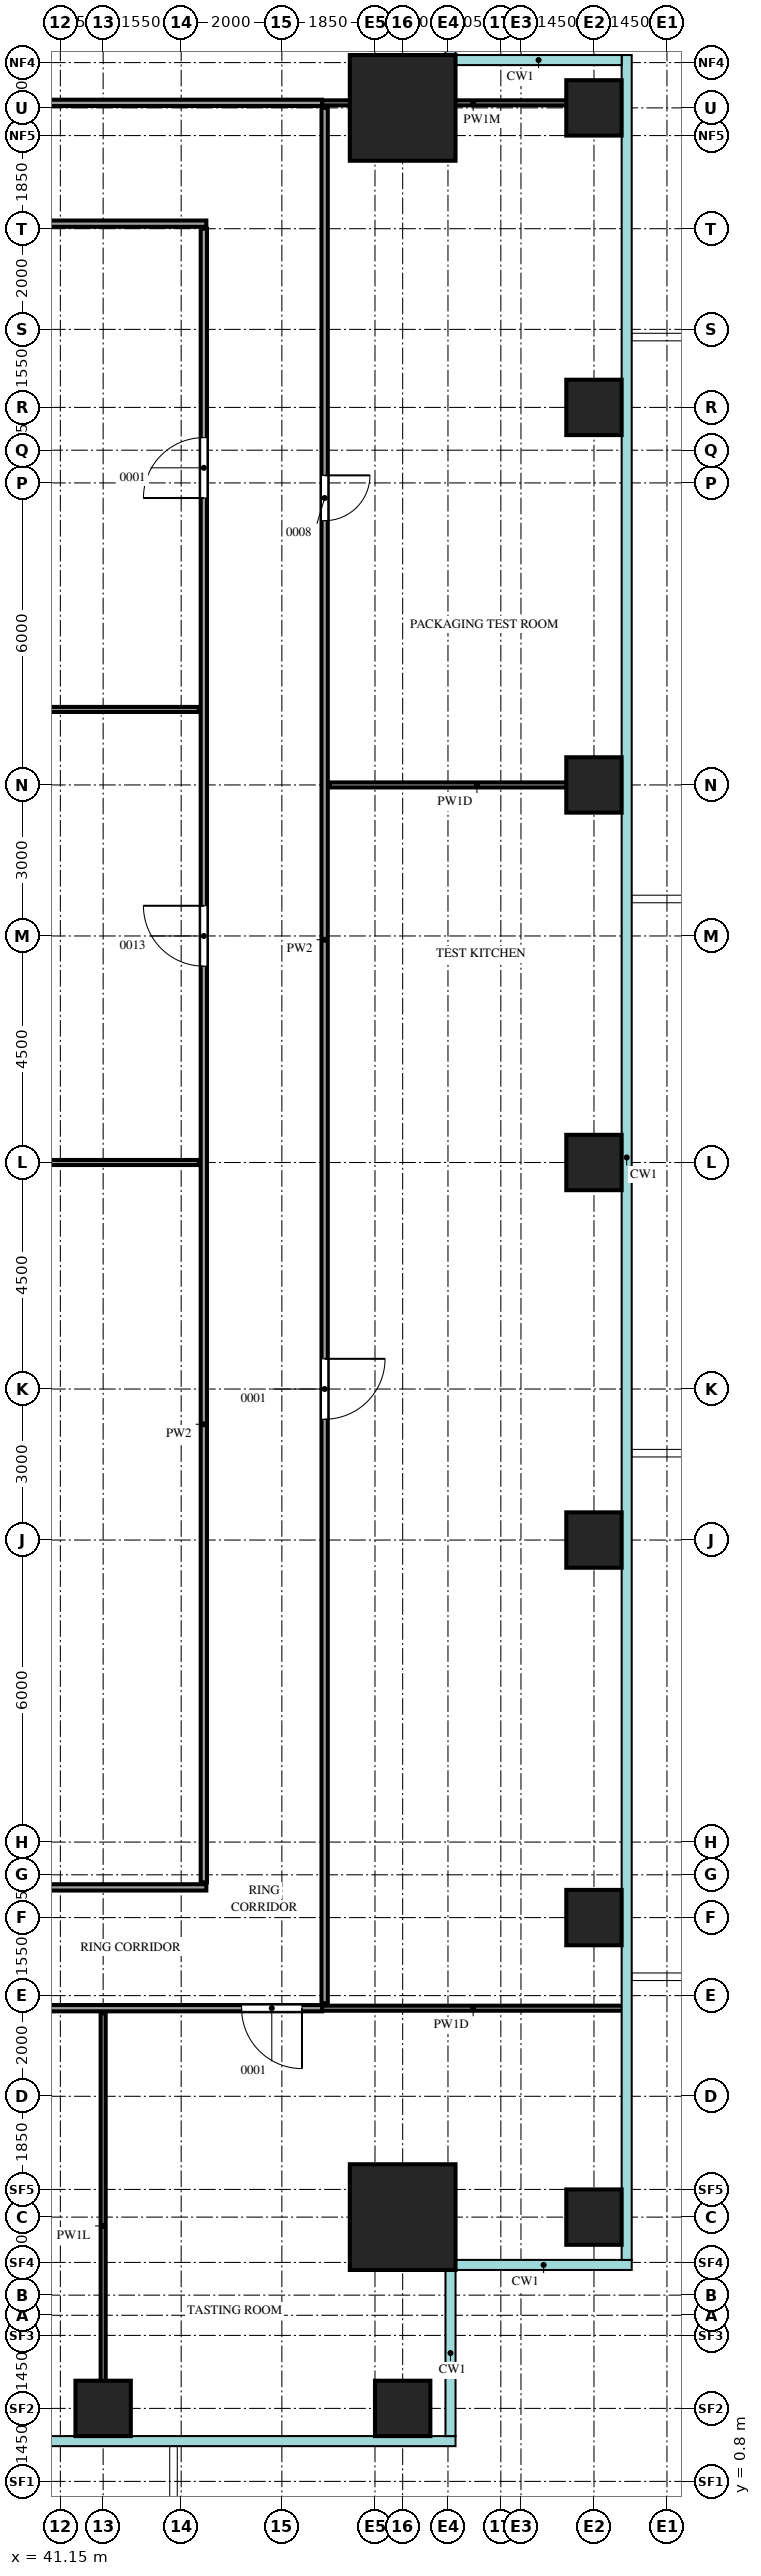
"""IFC4 building model, lengths in metres.
Left out: names, types, materials, properties, quantities, classifications, styles, units other than length and angle.
Written with IfcOpenShell. Run it as: python <this file> out.ifc"""

import sys

from ifc_helpers import new_model, si_unit, direction, frame, frame_2d, origin, origin_2d, place, context, subcontext, project, spatial, rectangle, extrude, source, transform, mapped, element, fill, save


model = new_model("IFC4")
c1 = context("Model", 3, precision=1e-05, world=origin(), true_north=direction((0.0, 1.0)))
c2 = subcontext(c1, "Body", "Model", "MODEL_VIEW")
j1 = project(units=[si_unit("LENGTHUNIT", "METRE"), si_unit("PLANEANGLEUNIT", "RADIAN")], contexts=[c1])
p1 = place(None, origin())
s1 = spatial("IfcSite", under=j1, at=p1, CompositionType="ELEMENT")
p2 = place(p1, origin())
s2 = spatial("IfcBuilding", under=s1, at=p2, CompositionType="ELEMENT")
p3 = place(p2, frame((0.0, 0.0, 123.5)))
s3 = spatial("IfcBuildingStorey", under=s2, at=p3, CompositionType="ELEMENT", Elevation=123.5)
m1 = source(origin(), c2, "Body", "SweptSolid", [
    extrude(rectangle(XDim=2.1, YDim=2.1, at=origin_2d()), origin(), (0.0, 0.0, 1.0), 4.4),
])
for number, where, z_axis, x_axis in (
    (1, (47.95, 47.95, 0.0), (0.0, 0.0, 1.0), (1.0, 0.0, 0.0)),
    (2, (47.95, 6.05, 0.0), (0.0, 0.0, 1.0), (1.0, 0.0, 0.0)),
):
    element("IfcColumn", number, at=place(p3, frame(where, z_axis=z_axis, x_axis=x_axis)), inside=s3, PredefinedType="COLUMN", context=c2, shape_type="MappedRepresentation", body=[
        mapped(m1, transform((0.0, 0.0, 0.0))),
    ])
m2 = source(origin(), c2, "Body", "SweptSolid", [
    extrude(rectangle(XDim=1.1, YDim=1.1, at=origin_2d()), origin(), (0.0, 0.0, 1.0), 4.1),
])
for number, where, z_axis, x_axis in (
    (3, (42.0, 2.25, 0.0), (0.0, 0.0, 1.0), (1.0, 0.0, 0.0)),
    (4, (47.95, 2.25, 0.0), (0.0, 0.0, 1.0), (1.0, 0.0, 0.0)),
    (5, (51.75, 6.05, 0.0), (0.0, 0.0, 1.0), (1.0, 0.0, 0.0)),
    (6, (51.75, 12.0, 0.0), (0.0, 0.0, 1.0), (1.0, 0.0, 0.0)),
    (7, (51.75, 19.5, 0.0), (0.0, 0.0, 1.0), (1.0, 0.0, 0.0)),
    (8, (51.75, 27.0, 0.0), (0.0, 0.0, 1.0), (1.0, 0.0, 0.0)),
    (9, (51.75, 34.5, 0.0), (0.0, 0.0, 1.0), (1.0, 0.0, 0.0)),
    (10, (51.75, 42.0, 0.0), (0.0, 0.0, 1.0), (1.0, 0.0, 0.0)),
    (11, (51.75, 47.95, 0.0), (0.0, 0.0, 1.0), (1.0, 0.0, 0.0)),
):
    element("IfcColumn", number, at=place(p3, frame(where, z_axis=z_axis, x_axis=x_axis)), inside=s3, PredefinedType="COLUMN", context=c2, shape_type="MappedRepresentation", body=[
        mapped(m2, transform((0.0, 0.0, 0.0))),
    ])
m3 = source(origin(), c2, "Body", "SweptSolid", [
    extrude(rectangle(XDim=8.45, YDim=0.1, at=frame_2d((4.225, 0.0))), origin(), (0.0, 0.0, 1.0), 3.6),
])
p4 = place(p3, frame((42.0, 1.65, 0.0), z_axis=(0.0, 0.0, 1.0), x_axis=(0.0, 1.0, 0.0)))
e12 = element("IfcWall", 12, at=p4, inside=s3, PredefinedType="PARTITIONING", context=c2, shape_type="MappedRepresentation", body=[
    mapped(m3, transform((0.0, 0.0, 0.0))),
])
m4 = source(origin(), c2, "Body", "SweptSolid", [
    extrude(rectangle(XDim=20.0, YDim=0.125, at=frame_2d((10.0, 0.0))), origin(), (0.0, 0.0, 1.0), 4.2),
])
p5 = place(p3, frame((26.35, 10.2, 0.0), z_axis=(0.0, 0.0, 1.0), x_axis=(1.0, 0.0, 0.0)))
e13 = element("IfcWall", 13, at=p5, inside=s3, PredefinedType="PARTITIONING", context=c2, shape_type="MappedRepresentation", body=[
    mapped(m4, transform((0.0, 0.0, 0.0))),
])
m5 = source(origin(), c2, "Body", "SweptSolid", [
    extrude(rectangle(XDim=1.2, YDim=2.1, at=frame_2d((0.6, 1.05))), frame((0.0, 0.073, 0.0), z_axis=(0.0, -1.0, 0.0), x_axis=(1.0, 0.0, 0.0)), (0.0, 0.0, 1.0), 0.145),
])
p6 = place(p5, frame((7.25, 0.0, 0.0)))
e14 = element("IfcOpeningElement", 14, at=p6, cuts=e13, PredefinedType="OPENING", context=c2, shape_type="MappedRepresentation", body=[
    mapped(m5, transform((0.0, 0.0, 0.0))),
])
p7 = place(p5, frame((18.4, 0.0, 0.0)))
e15 = element("IfcOpeningElement", 15, at=p7, cuts=e13, PredefinedType="OPENING", context=c2, shape_type="MappedRepresentation", body=[
    mapped(m5, transform((0.0, 0.0, 0.0))),
])
m6 = source(origin(), c2, "Body", "SweptSolid", [
    extrude(rectangle(XDim=6.0, YDim=0.1, at=frame_2d((3.0, 0.0))), origin(), (0.0, 0.0, 1.0), 4.2),
])
p8 = place(p3, frame((46.35, 10.2, 0.0), z_axis=(0.0, 0.0, 1.0), x_axis=(1.0, 0.0, 0.0)))
e16 = element("IfcWall", 16, at=p8, inside=s3, PredefinedType="PARTITIONING", context=c2, shape_type="MappedRepresentation", body=[
    mapped(m6, transform((0.0, 0.0, 0.0))),
])
m7 = source(origin(), c2, "Body", "SweptSolid", [
    extrude(rectangle(XDim=37.65, YDim=0.125, at=frame_2d((18.825, 0.0))), origin(), (0.0, 0.0, 1.0), 4.2),
])
p9 = place(p3, frame((46.4, 10.3, 0.0), z_axis=(0.0, 0.0, 1.0), x_axis=(0.0, 1.0, 0.0)))
e17 = element("IfcWall", 17, at=p9, inside=s3, PredefinedType="PARTITIONING", context=c2, shape_type="MappedRepresentation", body=[
    mapped(m7, transform((0.0, 0.0, 0.0))),
])
p10 = place(p9, frame((11.6, 0.0, 0.0)))
e18 = element("IfcOpeningElement", 18, at=p10, cuts=e17, PredefinedType="OPENING", context=c2, shape_type="MappedRepresentation", body=[
    mapped(m5, transform((0.0, 0.0, 0.0))),
])
m8 = source(origin(), c2, "Body", "SweptSolid", [
    extrude(rectangle(XDim=0.9, YDim=2.1, at=frame_2d((0.45, 1.05))), frame((0.0, 0.073, 0.0), z_axis=(0.0, -1.0, 0.0), x_axis=(1.0, 0.0, 0.0)), (0.0, 0.0, 1.0), 0.145),
])
p11 = place(p9, frame((29.45, 0.0, 0.0)))
e19 = element("IfcOpeningElement", 19, at=p11, cuts=e17, PredefinedType="OPENING", context=c2, shape_type="MappedRepresentation", body=[
    mapped(m8, transform((0.0, 0.0, 0.0))),
])
m9 = source(origin(), c2, "Body", "SweptSolid", [
    extrude(rectangle(XDim=17.7, YDim=0.125, at=frame_2d((8.85, 0.0))), origin(), (0.0, 0.0, 1.0), 4.2),
])
p12 = place(p3, frame((26.35, 12.6, 0.0), z_axis=(0.0, 0.0, 1.0), x_axis=(1.0, 0.0, 0.0)))
e20 = element("IfcWall", 20, at=p12, inside=s3, PredefinedType="PARTITIONING", context=c2, shape_type="MappedRepresentation", body=[
    mapped(m9, transform((0.0, 0.0, 0.0))),
])
m10 = source(origin(), c2, "Body", "SweptSolid", [
    extrude(rectangle(XDim=32.85, YDim=0.125, at=frame_2d((16.425, 0.0))), origin(), (0.0, 0.0, 1.0), 4.2),
])
p13 = place(p3, frame((44.0, 12.7, 0.0), z_axis=(0.0, 0.0, 1.0), x_axis=(0.0, 1.0, 0.0)))
e21 = element("IfcWall", 21, at=p13, inside=s3, PredefinedType="PARTITIONING", context=c2, shape_type="MappedRepresentation", body=[
    mapped(m10, transform((0.0, 0.0, 0.0))),
])
p14 = place(p13, frame((18.2, 0.0, 0.0)))
e22 = element("IfcOpeningElement", 22, at=p14, cuts=e21, PredefinedType="OPENING", context=c2, shape_type="MappedRepresentation", body=[
    mapped(m5, transform((0.0, 0.0, 0.0))),
])
p15 = place(p13, frame((27.5, 0.0, 0.0)))
e23 = element("IfcOpeningElement", 23, at=p15, cuts=e21, PredefinedType="OPENING", context=c2, shape_type="MappedRepresentation", body=[
    mapped(m5, transform((0.0, 0.0, 0.0))),
])
m11 = source(origin(), c2, "Body", "SweptSolid", [
    extrude(rectangle(XDim=17.4, YDim=0.1, at=frame_2d((8.7, 0.0))), origin(), (0.0, 0.0, 1.0), 4.2),
])
p16 = place(p3, frame((26.5, 27.0, 0.0), z_axis=(0.0, 0.0, 1.0), x_axis=(1.0, 0.0, 0.0)))
e24 = element("IfcWall", 24, at=p16, inside=s3, PredefinedType="PARTITIONING", context=c2, shape_type="MappedRepresentation", body=[
    mapped(m11, transform((0.0, 0.0, 0.0))),
])
m12 = source(origin(), c2, "Body", "SweptSolid", [
    extrude(rectangle(XDim=5.85, YDim=0.1, at=frame_2d((2.925, 0.0))), origin(), (0.0, 0.0, 1.0), 4.2),
])
p17 = place(p3, frame((46.5, 34.5, 0.0), z_axis=(0.0, 0.0, 1.0), x_axis=(1.0, 0.0, 0.0)))
e25 = element("IfcWall", 25, at=p17, inside=s3, PredefinedType="PARTITIONING", context=c2, shape_type="MappedRepresentation", body=[
    mapped(m12, transform((0.0, 0.0, 0.0))),
])
m13 = source(origin(), c2, "Body", "SweptSolid", [
    extrude(rectangle(XDim=13.35, YDim=0.1, at=frame_2d((6.675, 0.0))), origin(), (0.0, 0.0, 1.0), 4.2),
])
p18 = place(p3, frame((30.55, 36.0, 0.0), z_axis=(0.0, 0.0, 1.0), x_axis=(1.0, 0.0, 0.0)))
e26 = element("IfcWall", 26, at=p18, inside=s3, PredefinedType="PARTITIONING", context=c2, shape_type="MappedRepresentation", body=[
    mapped(m13, transform((0.0, 0.0, 0.0))),
])
m14 = source(origin(), c2, "Body", "SweptSolid", [
    extrude(rectangle(XDim=13.5, YDim=0.125, at=frame_2d((6.75, 0.0))), origin(), (0.0, 0.0, 1.0), 4.2),
])
p19 = place(p3, frame((30.55, 45.65, 0.0), z_axis=(0.0, 0.0, 1.0), x_axis=(1.0, 0.0, 0.0)))
e27 = element("IfcWall", 27, at=p19, inside=s3, PredefinedType="PARTITIONING", context=c2, shape_type="MappedRepresentation", body=[
    mapped(m14, transform((0.0, 0.0, 0.0))),
])
m15 = source(origin(), c2, "Body", "SweptSolid", [
    extrude(rectangle(XDim=42.2, YDim=0.125, at=frame_2d((21.1, 0.0))), origin(), (0.0, 0.0, 1.0), 3.55),
])
p20 = place(p3, frame((4.15, 48.05, 0.0), z_axis=(0.0, 0.0, 1.0), x_axis=(1.0, 0.0, 0.0)))
e28 = element("IfcWall", 28, at=p20, inside=s3, PredefinedType="PARTITIONING", context=c2, shape_type="MappedRepresentation", body=[
    mapped(m15, transform((0.0, 0.0, 0.0))),
])
p21 = place(p20, frame((7.25, 0.0, 0.0)))
e29 = element("IfcOpeningElement", 29, at=p21, cuts=e28, PredefinedType="OPENING", context=c2, shape_type="MappedRepresentation", body=[
    mapped(m8, transform((0.0, 0.0, 0.0))),
])
p22 = place(p20, frame((22.55, 0.0, 0.0)))
e30 = element("IfcOpeningElement", 30, at=p22, cuts=e28, PredefinedType="OPENING", context=c2, shape_type="MappedRepresentation", body=[
    mapped(m8, transform((0.0, 0.0, 0.0))),
])
p23 = place(p20, frame((35.85, 0.0, 0.0)))
e31 = element("IfcOpeningElement", 31, at=p23, cuts=e28, PredefinedType="OPENING", context=c2, shape_type="MappedRepresentation", body=[
    mapped(m8, transform((0.0, 0.0, 0.0))),
])
m16 = source(origin(), c2, "Body", "SweptSolid", [
    extrude(rectangle(XDim=6.0, YDim=0.1, at=frame_2d((3.0, 0.0))), origin(), (0.0, 0.0, 1.0), 3.55),
])
p24 = place(p3, frame((46.35, 48.05, 0.0), z_axis=(0.0, 0.0, 1.0), x_axis=(1.0, 0.0, 0.0)))
e32 = element("IfcWall", 32, at=p24, inside=s3, PredefinedType="PARTITIONING", context=c2, shape_type="MappedRepresentation", body=[
    mapped(m16, transform((0.0, 0.0, 0.0))),
])
m17 = source(origin(), c2, "Body", "SweptSolid", [
    extrude(rectangle(XDim=1.2, YDim=2.1, at=frame_2d((0.6, 1.05))), frame((0.0, 0.025, 0.0), z_axis=(0.0, -1.0, 0.0), x_axis=(1.0, 0.0, 0.0)), (0.0, 0.0, 1.0), 0.05),
])
p25 = place(p7, origin())
e33 = element("IfcDoor", 33, at=p25, inside=s3, OperationType="SINGLE_SWING_RIGHT", PredefinedType="DOOR", context=c2, shape_type="MappedRepresentation", body=[
    mapped(m17, transform((0.0, 0.0, 0.0))),
])
fill(e15, e33)
p26 = place(p14, origin())
e34 = element("IfcDoor", 34, at=p26, inside=s3, OperationType="SINGLE_SWING_LEFT", PredefinedType="DOOR", context=c2, shape_type="MappedRepresentation", body=[
    mapped(m17, transform((0.0, 0.0, 0.0))),
])
fill(e22, e34)
p27 = place(p15, origin())
e35 = element("IfcDoor", 35, at=p27, inside=s3, OperationType="SINGLE_SWING_RIGHT", PredefinedType="DOOR", context=c2, shape_type="MappedRepresentation", body=[
    mapped(m17, transform((0.0, 0.0, 0.0))),
])
fill(e23, e35)
p28 = place(p10, origin())
e36 = element("IfcDoor", 36, at=p28, inside=s3, OperationType="SINGLE_SWING_RIGHT", PredefinedType="DOOR", context=c2, shape_type="MappedRepresentation", body=[
    mapped(m17, transform((0.0, 0.0, 0.0))),
])
fill(e18, e36)
m18 = source(origin(), c2, "Body", "SweptSolid", [
    extrude(rectangle(XDim=0.9, YDim=2.1, at=frame_2d((0.45, 1.05))), frame((0.0, 0.025, 0.0), z_axis=(0.0, -1.0, 0.0), x_axis=(1.0, 0.0, 0.0)), (0.0, 0.0, 1.0), 0.05),
])
p29 = place(p11, origin())
e37 = element("IfcDoor", 37, at=p29, inside=s3, OperationType="SINGLE_SWING_RIGHT", PredefinedType="DOOR", context=c2, shape_type="MappedRepresentation", body=[
    mapped(m18, transform((0.0, 0.0, 0.0))),
])
fill(e19, e37)
save(model, sys.argv[1])
